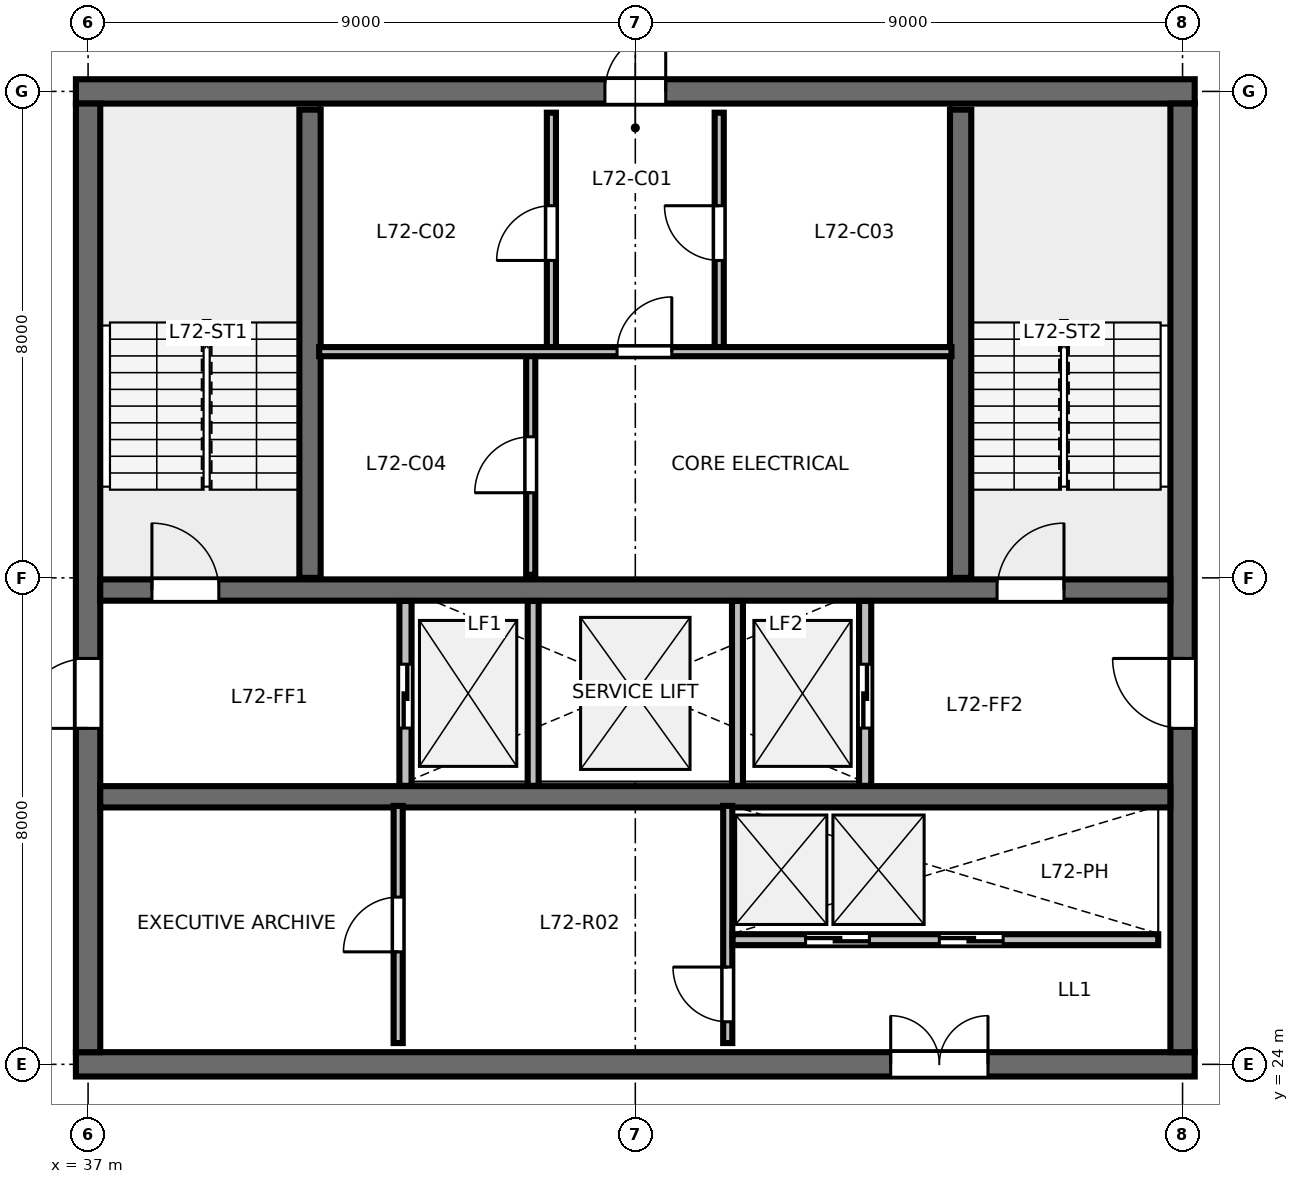
"""IFC4 building model, lengths in metres.
Left out: names, types, materials, properties, quantities, classifications, styles, units other than length and angle.
Written with IfcOpenShell. Run it as: python <this file> out.ifc"""

import sys

from ifc_helpers import new_model, si_unit, direction, frame, frame_2d, origin, place, context, subcontext, project, spatial, rectangle, extrude, element, fill, save


model = new_model("IFC4")
c1 = context("Model", 3, precision=1e-05, world=origin(), true_north=direction((0.0, 1.0)))
c2 = subcontext(c1, "Body", "Model", "MODEL_VIEW")
j1 = project(units=[si_unit("LENGTHUNIT", "METRE"), si_unit("PLANEANGLEUNIT", "RADIAN")], contexts=[c1])
p1 = place(None, origin())
s1 = spatial("IfcSite", under=j1, at=p1, CompositionType="ELEMENT")
p2 = place(p1, origin())
s2 = spatial("IfcBuilding", under=s1, at=p2, CompositionType="ELEMENT")
p3 = place(p2, frame((0.0, 0.0, 271.8)))
s3 = spatial("IfcBuildingStorey", under=s2, at=p3, CompositionType="ELEMENT", Elevation=271.8)
p4 = place(p3, frame((36.8, 24.0, 0.0), z_axis=(0.0, 0.0, 1.0), x_axis=(1.0, 0.0, 0.0)))
e1 = element("IfcWall", 1, at=p4, inside=s3, PredefinedType="SHEAR", context=c2, shape_type="SweptSolid", body=[
    extrude(rectangle(XDim=18.4, YDim=0.4, at=frame_2d((9.2, 0.0))), origin(), (0.0, 0.0, 1.0), 3.36),
])
p5 = place(p4, frame((13.4, 0.0, 0.0)))
e2 = element("IfcOpeningElement", 2, at=p5, cuts=e1, PredefinedType="OPENING", context=c2, shape_type="SweptSolid", body=[
    extrude(rectangle(XDim=1.6, YDim=2.15, at=frame_2d((0.8, 1.075))), frame((0.0, 0.21, 0.0), z_axis=(0.0, -1.0, 0.0), x_axis=(1.0, 0.0, 0.0)), (0.0, 0.0, 1.0), 0.42),
])
p6 = place(p3, frame((36.8, 40.0, 0.0), z_axis=(0.0, 0.0, 1.0), x_axis=(1.0, 0.0, 0.0)))
e3 = element("IfcWall", 3, at=p6, inside=s3, PredefinedType="SHEAR", context=c2, shape_type="SweptSolid", body=[
    extrude(rectangle(XDim=18.4, YDim=0.4, at=frame_2d((9.2, 0.0))), origin(), (0.0, 0.0, 1.0), 3.36),
])
p7 = place(p6, frame((8.7, 0.0, 0.0)))
e4 = element("IfcOpeningElement", 4, at=p7, cuts=e3, PredefinedType="OPENING", context=c2, shape_type="SweptSolid", body=[
    extrude(rectangle(XDim=1.0, YDim=2.15, at=frame_2d((0.5, 1.075))), frame((0.0, 0.21, 0.0), z_axis=(0.0, -1.0, 0.0), x_axis=(1.0, 0.0, 0.0)), (0.0, 0.0, 1.0), 0.42),
])
p8 = place(p3, frame((37.0, 24.2, 0.0), z_axis=(0.0, 0.0, 1.0), x_axis=(0.0, 1.0, 0.0)))
e5 = element("IfcWall", 5, at=p8, inside=s3, PredefinedType="SHEAR", context=c2, shape_type="SweptSolid", body=[
    extrude(rectangle(XDim=15.6, YDim=0.4, at=frame_2d((7.8, 0.0))), origin(), (0.0, 0.0, 1.0), 3.36),
])
p9 = place(p8, frame((5.325, 0.0, 0.0)))
e6 = element("IfcOpeningElement", 6, at=p9, cuts=e5, PredefinedType="OPENING", context=c2, shape_type="SweptSolid", body=[
    extrude(rectangle(XDim=1.15, YDim=2.15, at=frame_2d((0.575, 1.075))), frame((0.0, 0.21, 0.0), z_axis=(0.0, -1.0, 0.0), x_axis=(1.0, 0.0, 0.0)), (0.0, 0.0, 1.0), 0.42),
])
p10 = place(p3, frame((55.0, 24.2, 0.0), z_axis=(0.0, 0.0, 1.0), x_axis=(0.0, 1.0, 0.0)))
e7 = element("IfcWall", 7, at=p10, inside=s3, PredefinedType="SHEAR", context=c2, shape_type="SweptSolid", body=[
    extrude(rectangle(XDim=15.6, YDim=0.4, at=frame_2d((7.8, 0.0))), origin(), (0.0, 0.0, 1.0), 3.36),
])
p11 = place(p10, frame((5.325, 0.0, 0.0)))
e8 = element("IfcOpeningElement", 8, at=p11, cuts=e7, PredefinedType="OPENING", context=c2, shape_type="SweptSolid", body=[
    extrude(rectangle(XDim=1.15, YDim=2.15, at=frame_2d((0.575, 1.075))), frame((0.0, 0.21, 0.0), z_axis=(0.0, -1.0, 0.0), x_axis=(1.0, 0.0, 0.0)), (0.0, 0.0, 1.0), 0.42),
])
p12 = place(p3, frame((37.2, 31.8, 0.0), z_axis=(0.0, 0.0, 1.0), x_axis=(1.0, 0.0, 0.0)))
e9 = element("IfcWall", 9, at=p12, inside=s3, PredefinedType="SHEAR", context=c2, shape_type="SweptSolid", body=[
    extrude(rectangle(XDim=17.6, YDim=0.35, at=frame_2d((8.8, 0.0))), origin(), (0.0, 0.0, 1.0), 3.36),
])
p13 = place(p12, frame((0.85, 0.0, 0.0)))
e10 = element("IfcOpeningElement", 10, at=p13, cuts=e9, PredefinedType="OPENING", context=c2, shape_type="SweptSolid", body=[
    extrude(rectangle(XDim=1.1, YDim=2.15, at=frame_2d((0.55, 1.075))), frame((0.0, 0.185, 0.0), z_axis=(0.0, -1.0, 0.0), x_axis=(1.0, 0.0, 0.0)), (0.0, 0.0, 1.0), 0.37),
])
p14 = place(p12, frame((14.75, 0.0, 0.0)))
e11 = element("IfcOpeningElement", 11, at=p14, cuts=e9, PredefinedType="OPENING", context=c2, shape_type="SweptSolid", body=[
    extrude(rectangle(XDim=1.1, YDim=2.15, at=frame_2d((0.55, 1.075))), frame((0.0, 0.185, 0.0), z_axis=(0.0, -1.0, 0.0), x_axis=(1.0, 0.0, 0.0)), (0.0, 0.0, 1.0), 0.37),
])
p15 = place(p3, frame((37.2, 28.4, 0.0), z_axis=(0.0, 0.0, 1.0), x_axis=(1.0, 0.0, 0.0)))
e12 = element("IfcWall", 12, at=p15, inside=s3, PredefinedType="SHEAR", context=c2, shape_type="SweptSolid", body=[
    extrude(rectangle(XDim=17.6, YDim=0.35, at=frame_2d((8.8, 0.0))), origin(), (0.0, 0.0, 1.0), 3.36),
])
for number, where, z_axis, x_axis in (
    (13, (40.65, 32.0, 0.0), (0.0, 0.0, 1.0), (0.0, 1.0, 0.0)),
    (14, (51.35, 32.0, 0.0), (0.0, 0.0, 1.0), (0.0, 1.0, 0.0)),
):
    element("IfcWall", number, at=place(p3, frame(where, z_axis=z_axis, x_axis=x_axis)), inside=s3, PredefinedType="SHEAR", context=c2, shape_type="SweptSolid", body=[
        extrude(rectangle(XDim=7.7, YDim=0.35, at=frame_2d((3.85, 0.0))), origin(), (0.0, 0.0, 1.0), 3.6),
    ])
p16 = place(p3, frame((44.62, 35.72, 0.0), z_axis=(0.0, 0.0, 1.0), x_axis=(0.0, 1.0, 0.0)))
e15 = element("IfcWall", 15, at=p16, inside=s3, PredefinedType="PARTITIONING", context=c2, shape_type="SweptSolid", body=[
    extrude(rectangle(XDim=3.93, YDim=0.15, at=frame_2d((1.965, 0.0))), origin(), (0.0, 0.0, 1.0), 3.375),
])
p17 = place(p16, frame((1.5, 0.0, 0.0)))
e16 = element("IfcOpeningElement", 16, at=p17, cuts=e15, PredefinedType="OPENING", context=c2, shape_type="SweptSolid", body=[
    extrude(rectangle(XDim=0.9, YDim=2.15, at=frame_2d((0.45, 1.075))), frame((0.0, 0.085, 0.0), z_axis=(0.0, -1.0, 0.0), x_axis=(1.0, 0.0, 0.0)), (0.0, 0.0, 1.0), 0.17),
])
p18 = place(p3, frame((47.38, 35.72, 0.0), z_axis=(0.0, 0.0, 1.0), x_axis=(0.0, 1.0, 0.0)))
e17 = element("IfcWall", 17, at=p18, inside=s3, PredefinedType="PARTITIONING", context=c2, shape_type="SweptSolid", body=[
    extrude(rectangle(XDim=3.93, YDim=0.15, at=frame_2d((1.965, 0.0))), origin(), (0.0, 0.0, 1.0), 3.375),
])
p19 = place(p18, frame((1.5, 0.0, 0.0)))
e18 = element("IfcOpeningElement", 18, at=p19, cuts=e17, PredefinedType="OPENING", context=c2, shape_type="SweptSolid", body=[
    extrude(rectangle(XDim=0.9, YDim=2.15, at=frame_2d((0.45, 1.075))), frame((0.0, 0.085, 0.0), z_axis=(0.0, -1.0, 0.0), x_axis=(1.0, 0.0, 0.0)), (0.0, 0.0, 1.0), 0.17),
])
p20 = place(p3, frame((44.28, 32.05, 0.0), z_axis=(0.0, 0.0, 1.0), x_axis=(0.0, 1.0, 0.0)))
e19 = element("IfcWall", 19, at=p20, inside=s3, PredefinedType="PARTITIONING", context=c2, shape_type="SweptSolid", body=[
    extrude(rectangle(XDim=3.67, YDim=0.15, at=frame_2d((1.835, 0.0))), origin(), (0.0, 0.0, 1.0), 3.375),
])
p21 = place(p20, frame((1.35, 0.0, 0.0)))
e20 = element("IfcOpeningElement", 20, at=p21, cuts=e19, PredefinedType="OPENING", context=c2, shape_type="SweptSolid", body=[
    extrude(rectangle(XDim=0.92, YDim=2.15, at=frame_2d((0.46, 1.075))), frame((0.0, 0.085, 0.0), z_axis=(0.0, -1.0, 0.0), x_axis=(1.0, 0.0, 0.0)), (0.0, 0.0, 1.0), 0.17),
])
p22 = place(p3, frame((40.8, 35.72, 0.0), z_axis=(0.0, 0.0, 1.0), x_axis=(1.0, 0.0, 0.0)))
e21 = element("IfcWall", 21, at=p22, inside=s3, PredefinedType="PARTITIONING", context=c2, shape_type="SweptSolid", body=[
    extrude(rectangle(XDim=10.4, YDim=0.15, at=frame_2d((5.2, 0.0))), origin(), (0.0, 0.0, 1.0), 3.375),
])
p23 = place(p22, frame((4.9, 0.0, 0.0)))
e22 = element("IfcOpeningElement", 22, at=p23, cuts=e21, PredefinedType="OPENING", context=c2, shape_type="SweptSolid", body=[
    extrude(rectangle(XDim=0.9, YDim=2.15, at=frame_2d((0.45, 1.075))), frame((0.0, 0.085, 0.0), z_axis=(0.0, -1.0, 0.0), x_axis=(1.0, 0.0, 0.0)), (0.0, 0.0, 1.0), 0.17),
])
p24 = place(p3, frame((42.22, 28.58, 0.0), z_axis=(0.0, 0.0, 1.0), x_axis=(0.0, 1.0, 0.0)))
e23 = element("IfcWall", 23, at=p24, inside=s3, PredefinedType="PARTITIONING", context=c2, shape_type="SweptSolid", body=[
    extrude(rectangle(XDim=3.04, YDim=0.2, at=frame_2d((1.52, 0.0))), origin(), (0.0, 0.0, 1.0), 3.375),
])
p25 = place(p24, frame((0.95, 0.0, 0.0)))
e24 = element("IfcOpeningElement", 24, at=p25, cuts=e23, PredefinedType="OPENING", context=c2, shape_type="SweptSolid", body=[
    extrude(rectangle(XDim=1.05, YDim=2.15, at=frame_2d((0.525, 1.075))), frame((0.0, 0.11, 0.0), z_axis=(0.0, -1.0, 0.0), x_axis=(1.0, 0.0, 0.0)), (0.0, 0.0, 1.0), 0.22),
])
p26 = place(p3, frame((49.78, 28.58, 0.0), z_axis=(0.0, 0.0, 1.0), x_axis=(0.0, 1.0, 0.0)))
e25 = element("IfcWall", 25, at=p26, inside=s3, PredefinedType="PARTITIONING", context=c2, shape_type="SweptSolid", body=[
    extrude(rectangle(XDim=3.04, YDim=0.2, at=frame_2d((1.52, 0.0))), origin(), (0.0, 0.0, 1.0), 3.375),
])
p27 = place(p26, frame((0.95, 0.0, 0.0)))
e26 = element("IfcOpeningElement", 26, at=p27, cuts=e25, PredefinedType="OPENING", context=c2, shape_type="SweptSolid", body=[
    extrude(rectangle(XDim=1.05, YDim=2.15, at=frame_2d((0.525, 1.075))), frame((0.0, 0.11, 0.0), z_axis=(0.0, -1.0, 0.0), x_axis=(1.0, 0.0, 0.0)), (0.0, 0.0, 1.0), 0.22),
])
for number, where, z_axis, x_axis in (
    (27, (44.32, 28.58, 0.0), (0.0, 0.0, 1.0), (0.0, 1.0, 0.0)),
    (28, (47.68, 28.58, 0.0), (0.0, 0.0, 1.0), (0.0, 1.0, 0.0)),
):
    element("IfcWall", number, at=place(p3, frame(where, z_axis=z_axis, x_axis=x_axis)), inside=s3, PredefinedType="PARTITIONING", context=c2, shape_type="SweptSolid", body=[
        extrude(rectangle(XDim=3.04, YDim=0.18, at=frame_2d((1.52, 0.0))), origin(), (0.0, 0.0, 1.0), 3.375),
    ])
p28 = place(p3, frame((42.1, 24.35, 0.0), z_axis=(0.0, 0.0, 1.0), x_axis=(0.0, 1.0, 0.0)))
e29 = element("IfcWall", 29, at=p28, inside=s3, PredefinedType="PARTITIONING", context=c2, shape_type="SweptSolid", body=[
    extrude(rectangle(XDim=3.9, YDim=0.15, at=frame_2d((1.95, 0.0))), origin(), (0.0, 0.0, 1.0), 3.375),
])
p29 = place(p28, frame((1.5, 0.0, 0.0)))
e30 = element("IfcOpeningElement", 30, at=p29, cuts=e29, PredefinedType="OPENING", context=c2, shape_type="SweptSolid", body=[
    extrude(rectangle(XDim=0.9, YDim=2.15, at=frame_2d((0.45, 1.075))), frame((0.0, 0.085, 0.0), z_axis=(0.0, -1.0, 0.0), x_axis=(1.0, 0.0, 0.0)), (0.0, 0.0, 1.0), 0.17),
])
p30 = place(p3, frame((47.52, 24.35, 0.0), z_axis=(0.0, 0.0, 1.0), x_axis=(0.0, 1.0, 0.0)))
e31 = element("IfcWall", 31, at=p30, inside=s3, PredefinedType="PARTITIONING", context=c2, shape_type="SweptSolid", body=[
    extrude(rectangle(XDim=3.9, YDim=0.15, at=frame_2d((1.95, 0.0))), origin(), (0.0, 0.0, 1.0), 3.375),
])
p31 = place(p30, frame((0.35, 0.0, 0.0)))
e32 = element("IfcOpeningElement", 32, at=p31, cuts=e31, PredefinedType="OPENING", context=c2, shape_type="SweptSolid", body=[
    extrude(rectangle(XDim=0.9, YDim=2.15, at=frame_2d((0.45, 1.075))), frame((0.0, 0.085, 0.0), z_axis=(0.0, -1.0, 0.0), x_axis=(1.0, 0.0, 0.0)), (0.0, 0.0, 1.0), 0.17),
])
p32 = place(p3, frame((47.6, 26.05, 0.0), z_axis=(0.0, 0.0, 1.0), x_axis=(1.0, 0.0, 0.0)))
e33 = element("IfcWall", 33, at=p32, inside=s3, PredefinedType="PARTITIONING", context=c2, shape_type="SweptSolid", body=[
    extrude(rectangle(XDim=7.0, YDim=0.18, at=frame_2d((3.5, 0.0))), origin(), (0.0, 0.0, 1.0), 3.375),
])
p33 = place(p32, frame((1.2, 0.0, 0.0)))
e34 = element("IfcOpeningElement", 34, at=p33, cuts=e33, PredefinedType="OPENING", context=c2, shape_type="SweptSolid", body=[
    extrude(rectangle(XDim=1.05, YDim=2.15, at=frame_2d((0.525, 1.075))), frame((0.0, 0.1, 0.0), z_axis=(0.0, -1.0, 0.0), x_axis=(1.0, 0.0, 0.0)), (0.0, 0.0, 1.0), 0.2),
])
p34 = place(p32, frame((3.4, 0.0, 0.0)))
e35 = element("IfcOpeningElement", 35, at=p34, cuts=e33, PredefinedType="OPENING", context=c2, shape_type="SweptSolid", body=[
    extrude(rectangle(XDim=1.05, YDim=2.15, at=frame_2d((0.525, 1.075))), frame((0.0, 0.1, 0.0), z_axis=(0.0, -1.0, 0.0), x_axis=(1.0, 0.0, 0.0)), (0.0, 0.0, 1.0), 0.2),
])
p35 = place(p13, origin())
e36 = element("IfcDoor", 36, at=p35, inside=s3, OperationType="SINGLE_SWING_LEFT", PredefinedType="DOOR", context=c2, shape_type="SweptSolid", body=[
    extrude(rectangle(XDim=1.1, YDim=2.15, at=frame_2d((0.55, 1.075))), frame((0.0, 0.025, 0.0), z_axis=(0.0, -1.0, 0.0), x_axis=(1.0, 0.0, 0.0)), (0.0, 0.0, 1.0), 0.05),
])
fill(e10, e36)
p36 = place(p14, origin())
e37 = element("IfcDoor", 37, at=p36, inside=s3, OperationType="SINGLE_SWING_RIGHT", PredefinedType="DOOR", context=c2, shape_type="SweptSolid", body=[
    extrude(rectangle(XDim=1.1, YDim=2.15, at=frame_2d((0.55, 1.075))), frame((0.0, 0.025, 0.0), z_axis=(0.0, -1.0, 0.0), x_axis=(1.0, 0.0, 0.0)), (0.0, 0.0, 1.0), 0.05),
])
fill(e11, e37)
p37 = place(p7, origin())
e38 = element("IfcDoor", 38, at=p37, inside=s3, OperationType="SINGLE_SWING_RIGHT", PredefinedType="DOOR", context=c2, shape_type="SweptSolid", body=[
    extrude(rectangle(XDim=1.0, YDim=2.15, at=frame_2d((0.5, 1.075))), frame((0.0, 0.025, 0.0), z_axis=(0.0, -1.0, 0.0), x_axis=(1.0, 0.0, 0.0)), (0.0, 0.0, 1.0), 0.05),
])
fill(e4, e38)
p38 = place(p9, origin())
e39 = element("IfcDoor", 39, at=p38, inside=s3, OperationType="SINGLE_SWING_LEFT", PredefinedType="DOOR", context=c2, shape_type="SweptSolid", body=[
    extrude(rectangle(XDim=1.15, YDim=2.15, at=frame_2d((0.575, 1.075))), frame((0.0, 0.025, 0.0), z_axis=(0.0, -1.0, 0.0), x_axis=(1.0, 0.0, 0.0)), (0.0, 0.0, 1.0), 0.05),
])
fill(e6, e39)
p39 = place(p11, origin())
e40 = element("IfcDoor", 40, at=p39, inside=s3, OperationType="SINGLE_SWING_RIGHT", PredefinedType="DOOR", context=c2, shape_type="SweptSolid", body=[
    extrude(rectangle(XDim=1.15, YDim=2.15, at=frame_2d((0.575, 1.075))), frame((0.0, 0.025, 0.0), z_axis=(0.0, -1.0, 0.0), x_axis=(1.0, 0.0, 0.0)), (0.0, 0.0, 1.0), 0.05),
])
fill(e8, e40)
p40 = place(p5, origin())
e41 = element("IfcDoor", 41, at=p40, inside=s3, OperationType="DOUBLE_DOOR_SINGLE_SWING", PredefinedType="DOOR", context=c2, shape_type="SweptSolid", body=[
    extrude(rectangle(XDim=1.6, YDim=2.15, at=frame_2d((0.8, 1.075))), frame((0.0, 0.025, 0.0), z_axis=(0.0, -1.0, 0.0), x_axis=(1.0, 0.0, 0.0)), (0.0, 0.0, 1.0), 0.05),
])
fill(e2, e41)
p41 = place(p17, origin())
e42 = element("IfcDoor", 42, at=p41, inside=s3, OperationType="SINGLE_SWING_LEFT", PredefinedType="DOOR", context=c2, shape_type="SweptSolid", body=[
    extrude(rectangle(XDim=0.9, YDim=2.15, at=frame_2d((0.45, 1.075))), frame((0.0, 0.025, 0.0), z_axis=(0.0, -1.0, 0.0), x_axis=(1.0, 0.0, 0.0)), (0.0, 0.0, 1.0), 0.05),
])
fill(e16, e42)
p42 = place(p19, origin())
e43 = element("IfcDoor", 43, at=p42, inside=s3, OperationType="SINGLE_SWING_RIGHT", PredefinedType="DOOR", context=c2, shape_type="SweptSolid", body=[
    extrude(rectangle(XDim=0.9, YDim=2.15, at=frame_2d((0.45, 1.075))), frame((0.0, 0.025, 0.0), z_axis=(0.0, -1.0, 0.0), x_axis=(1.0, 0.0, 0.0)), (0.0, 0.0, 1.0), 0.05),
])
fill(e18, e43)
p43 = place(p21, origin())
e44 = element("IfcDoor", 44, at=p43, inside=s3, OperationType="SINGLE_SWING_LEFT", PredefinedType="DOOR", context=c2, shape_type="SweptSolid", body=[
    extrude(rectangle(XDim=0.92, YDim=2.15, at=frame_2d((0.46, 1.075))), frame((0.0, 0.025, 0.0), z_axis=(0.0, -1.0, 0.0), x_axis=(1.0, 0.0, 0.0)), (0.0, 0.0, 1.0), 0.05),
])
fill(e20, e44)
p44 = place(p23, origin())
e45 = element("IfcDoor", 45, at=p44, inside=s3, OperationType="SINGLE_SWING_RIGHT", PredefinedType="DOOR", context=c2, shape_type="SweptSolid", body=[
    extrude(rectangle(XDim=0.9, YDim=2.15, at=frame_2d((0.45, 1.075))), frame((0.0, 0.025, 0.0), z_axis=(0.0, -1.0, 0.0), x_axis=(1.0, 0.0, 0.0)), (0.0, 0.0, 1.0), 0.05),
])
fill(e22, e45)
p45 = place(p25, origin())
e46 = element("IfcDoor", 46, at=p45, inside=s3, OperationType="SLIDING_TO_LEFT", PredefinedType="DOOR", context=c2, shape_type="SweptSolid", body=[
    extrude(rectangle(XDim=1.05, YDim=2.15, at=frame_2d((0.525, 1.075))), frame((0.0, 0.025, 0.0), z_axis=(0.0, -1.0, 0.0), x_axis=(1.0, 0.0, 0.0)), (0.0, 0.0, 1.0), 0.05),
])
fill(e24, e46)
p46 = place(p27, origin())
e47 = element("IfcDoor", 47, at=p46, inside=s3, OperationType="SLIDING_TO_RIGHT", PredefinedType="DOOR", context=c2, shape_type="SweptSolid", body=[
    extrude(rectangle(XDim=1.05, YDim=2.15, at=frame_2d((0.525, 1.075))), frame((0.0, 0.025, 0.0), z_axis=(0.0, -1.0, 0.0), x_axis=(1.0, 0.0, 0.0)), (0.0, 0.0, 1.0), 0.05),
])
fill(e26, e47)
p47 = place(p29, origin())
e48 = element("IfcDoor", 48, at=p47, inside=s3, OperationType="SINGLE_SWING_LEFT", PredefinedType="DOOR", context=c2, shape_type="SweptSolid", body=[
    extrude(rectangle(XDim=0.9, YDim=2.15, at=frame_2d((0.45, 1.075))), frame((0.0, 0.025, 0.0), z_axis=(0.0, -1.0, 0.0), x_axis=(1.0, 0.0, 0.0)), (0.0, 0.0, 1.0), 0.05),
])
fill(e30, e48)
p48 = place(p31, origin())
e49 = element("IfcDoor", 49, at=p48, inside=s3, OperationType="SINGLE_SWING_RIGHT", PredefinedType="DOOR", context=c2, shape_type="SweptSolid", body=[
    extrude(rectangle(XDim=0.9, YDim=2.15, at=frame_2d((0.45, 1.075))), frame((0.0, 0.025, 0.0), z_axis=(0.0, -1.0, 0.0), x_axis=(1.0, 0.0, 0.0)), (0.0, 0.0, 1.0), 0.05),
])
fill(e32, e49)
p49 = place(p33, origin())
e50 = element("IfcDoor", 50, at=p49, inside=s3, OperationType="SLIDING_TO_LEFT", PredefinedType="DOOR", context=c2, shape_type="SweptSolid", body=[
    extrude(rectangle(XDim=1.05, YDim=2.15, at=frame_2d((0.525, 1.075))), frame((0.0, 0.025, 0.0), z_axis=(0.0, -1.0, 0.0), x_axis=(1.0, 0.0, 0.0)), (0.0, 0.0, 1.0), 0.05),
])
fill(e34, e50)
p50 = place(p34, origin())
e51 = element("IfcDoor", 51, at=p50, inside=s3, OperationType="SLIDING_TO_RIGHT", PredefinedType="DOOR", context=c2, shape_type="SweptSolid", body=[
    extrude(rectangle(XDim=1.05, YDim=2.15, at=frame_2d((0.525, 1.075))), frame((0.0, 0.025, 0.0), z_axis=(0.0, -1.0, 0.0), x_axis=(1.0, 0.0, 0.0)), (0.0, 0.0, 1.0), 0.05),
])
fill(e35, e51)
save(model, sys.argv[1])
